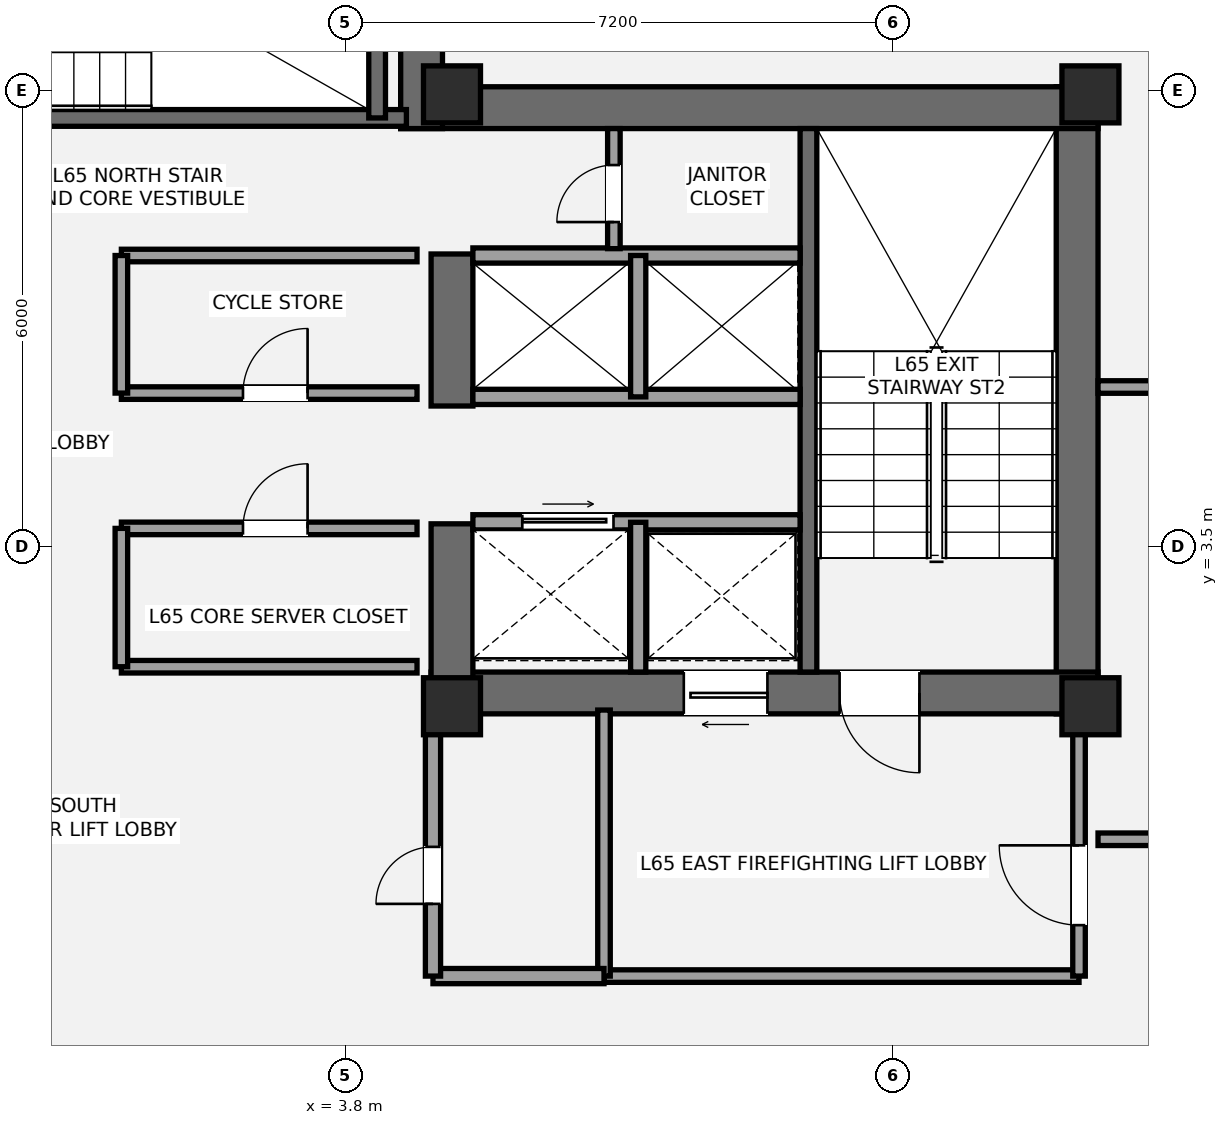
"""IFC4 building model, lengths in metres.
Left out: names, types, materials, properties, quantities, classifications, styles, units other than length and angle.
Written with IfcOpenShell. Run it as: python <this file> out.ifc"""

import sys

from ifc_helpers import new_model, si_unit, direction, frame, frame_2d, origin, origin_2d, place, context, subcontext, project, spatial, rectangle, extrude, element, fill, save


model = new_model("IFC4")
c1 = context("Model", 3, precision=1e-05, world=origin(), true_north=direction((0.0, 1.0)))
c2 = subcontext(c1, "Body", "Model", "MODEL_VIEW")
j1 = project(units=[si_unit("LENGTHUNIT", "METRE"), si_unit("PLANEANGLEUNIT", "RADIAN")], contexts=[c1])
p1 = place(None, origin())
s1 = spatial("IfcSite", under=j1, at=p1, CompositionType="ELEMENT")
p2 = place(p1, origin())
s2 = spatial("IfcBuilding", under=s1, at=p2, CompositionType="ELEMENT")
p3 = place(p2, frame((0.0, 0.0, 232.05)))
s3 = spatial("IfcBuildingStorey", under=s2, at=p3, CompositionType="ELEMENT", Elevation=232.05)
p4 = place(p3, frame((13.425, 1.3, 0.0), z_axis=(0.0, 0.0, 1.0), x_axis=(0.0, 1.0, 0.0)))
e1 = element("IfcWall", 1, at=p4, inside=s3, PredefinedType="SHEAR", context=c2, shape_type="SweptSolid", body=[
    extrude(rectangle(XDim=8.25, YDim=0.55, at=frame_2d((4.125, 0.0))), origin(), (0.0, 0.0, 1.0), 3.15),
])
p5 = place(p3, frame((4.525, 9.275, 0.0), z_axis=(0.0, 0.0, 1.0), x_axis=(1.0, 0.0, 0.0)))
e2 = element("IfcWall", 2, at=p5, inside=s3, PredefinedType="SHEAR", context=c2, shape_type="SweptSolid", body=[
    extrude(rectangle(XDim=9.175, YDim=0.55, at=frame_2d((4.587, 0.0))), origin(), (0.0, 0.0, 1.0), 3.15),
])
p6 = place(p3, frame((13.7, 1.575, 0.0), z_axis=(0.0, 0.0, 1.0), x_axis=(-1.0, 0.0, 0.0)))
e3 = element("IfcWall", 3, at=p6, inside=s3, PredefinedType="SHEAR", context=c2, shape_type="SweptSolid", body=[
    extrude(rectangle(XDim=8.775, YDim=0.55, at=frame_2d((4.387, 0.0))), origin(), (0.0, 0.0, 1.0), 3.15),
])
p7 = place(p6, frame((2.35, 0.0, 0.0)))
e4 = element("IfcOpeningElement", 4, at=p7, cuts=e3, PredefinedType="OPENING", context=c2, shape_type="SweptSolid", body=[
    extrude(rectangle(XDim=1.05, YDim=2.15, at=frame_2d((0.525, 1.075))), frame((0.0, 0.285, 0.0), z_axis=(0.0, -1.0, 0.0), x_axis=(1.0, 0.0, 0.0)), (0.0, 0.0, 1.0), 0.57),
])
p8 = place(p6, frame((4.35, 0.0, 0.0)))
e5 = element("IfcOpeningElement", 5, at=p8, cuts=e3, PredefinedType="OPENING", context=c2, shape_type="SweptSolid", body=[
    extrude(rectangle(XDim=1.1, YDim=2.2, at=frame_2d((0.55, 1.1))), frame((0.0, 0.285, 0.0), z_axis=(0.0, -1.0, 0.0), x_axis=(1.0, 0.0, 0.0)), (0.0, 0.0, 1.0), 0.57),
])
p9 = place(p3, frame((5.2, 1.3, 0.0), z_axis=(0.0, 0.0, 1.0), x_axis=(0.0, 1.0, 0.0)))
e6 = element("IfcWall", 6, at=p9, inside=s3, PredefinedType="SHEAR", context=c2, shape_type="SweptSolid", body=[
    extrude(rectangle(XDim=2.5, YDim=0.55, at=frame_2d((1.25, 0.0))), origin(), (0.0, 0.0, 1.0), 3.15),
])
p10 = place(p3, frame((5.2, 5.35, 0.0), z_axis=(0.0, 0.0, 1.0), x_axis=(0.0, 1.0, 0.0)))
e7 = element("IfcWall", 7, at=p10, inside=s3, PredefinedType="SHEAR", context=c2, shape_type="SweptSolid", body=[
    extrude(rectangle(XDim=2.0, YDim=0.55, at=frame_2d((1.0, 0.0))), origin(), (0.0, 0.0, 1.0), 3.15),
])
p11 = place(p3, frame((9.89, 1.85, 0.0), z_axis=(0.0, 0.0, 1.0), x_axis=(0.0, 1.0, 0.0)))
e8 = element("IfcWall", 8, at=p11, inside=s3, PredefinedType="SHEAR", context=c2, shape_type="SweptSolid", body=[
    extrude(rectangle(XDim=7.15, YDim=0.22, at=frame_2d((3.575, 0.0))), origin(), (0.0, 0.0, 1.0), 3.15),
])
p12 = place(p3, frame((4.8, 9.0, 0.0), z_axis=(0.0, 0.0, 1.0), x_axis=(0.0, 1.0, 0.0)))
e9 = element("IfcWall", 9, at=p12, inside=s3, PredefinedType="SHEAR", context=c2, shape_type="SweptSolid", body=[
    extrude(rectangle(XDim=3.95, YDim=0.55, at=frame_2d((1.975, 0.0))), origin(), (0.0, 0.0, 1.0), 3.15),
])
p13 = place(p3, frame((-4.7, 9.14, 0.0), z_axis=(0.0, 0.0, 1.0), x_axis=(1.0, 0.0, 0.0)))
e10 = element("IfcWall", 10, at=p13, inside=s3, PredefinedType="SHEAR", context=c2, shape_type="SweptSolid", body=[
    extrude(rectangle(XDim=9.3, YDim=0.22, at=frame_2d((4.65, 0.0))), origin(), (0.0, 0.0, 1.0), 3.15),
])
p14 = place(p13, frame((1.15, 0.0, 0.0)))
e11 = element("IfcOpeningElement", 11, at=p14, cuts=e10, PredefinedType="OPENING", context=c2, shape_type="SweptSolid", body=[
    extrude(rectangle(XDim=1.05, YDim=2.15, at=frame_2d((0.525, 1.075))), frame((0.0, 0.12, 0.0), z_axis=(0.0, -1.0, 0.0), x_axis=(1.0, 0.0, 0.0)), (0.0, 0.0, 1.0), 0.24),
])
p15 = place(p3, frame((4.215, 9.14, 0.0), z_axis=(0.0, 0.0, 1.0), x_axis=(0.0, 1.0, 0.0)))
e12 = element("IfcWall", 12, at=p15, inside=s3, PredefinedType="SHEAR", context=c2, shape_type="SweptSolid", body=[
    extrude(rectangle(XDim=3.26, YDim=0.22, at=frame_2d((1.63, 0.0))), origin(), (0.0, 0.0, 1.0), 3.15),
])
for number, where, z_axis, x_axis in (
    (13, (5.2, 1.4, 0.0), (0.0, 0.0, 1.0), (1.0, 0.0, 0.0)),
    (14, (5.2, 9.45, 0.0), (0.0, 0.0, 1.0), (1.0, 0.0, 0.0)),
    (15, (13.6, 1.4, 0.0), (0.0, 0.0, 1.0), (1.0, 0.0, 0.0)),
    (16, (13.6, 9.45, 0.0), (0.0, 0.0, 1.0), (1.0, 0.0, 0.0)),
):
    element("IfcColumn", number, at=place(p3, frame(where, z_axis=z_axis, x_axis=x_axis)), inside=s3, PredefinedType="PILASTER", context=c2, shape_type="SweptSolid", body=[
        extrude(rectangle(XDim=0.75, YDim=0.75, at=origin_2d()), origin(), (0.0, 0.0, 1.0), 3.15),
    ])
p16 = place(p3, frame((14.159, 11.619, 0.0), z_axis=(0.0, 0.0, 1.0), x_axis=(0.827641205742, -0.56125754744, 0.0)))
e17 = element("IfcWall", 17, at=p16, inside=s3, PredefinedType="STANDARD", context=c2, shape_type="SweptSolid", body=[
    extrude(rectangle(XDim=3.771, YDim=0.44, at=frame_2d((1.885, 0.0))), origin(), (0.0, 0.0, 1.0), 2.336),
])
p17 = place(p16, frame((1.477, 0.0, 0.55)))
e18 = element("IfcOpeningElement", 18, at=p17, cuts=e17, PredefinedType="OPENING", context=c2, shape_type="SweptSolid", body=[
    extrude(rectangle(XDim=1.75, YDim=1.55, at=frame_2d((0.875, 0.775))), frame((0.0, 0.23, 0.0), z_axis=(0.0, -1.0, 0.0), x_axis=(1.0, 0.0, 0.0)), (0.0, 0.0, 1.0), 0.46),
])
p18 = place(p3, frame((7.2, -2.15, 0.0), z_axis=(0.0, 0.0, 1.0), x_axis=(1.0, 0.0, 0.0)))
e19 = element("IfcWall", 19, at=p18, inside=s3, PredefinedType="PARTITIONING", context=c2, shape_type="SweptSolid", body=[
    extrude(rectangle(XDim=6.25, YDim=0.165, at=frame_2d((3.125, 0.0))), origin(), (0.0, 0.0, 1.0), 2.97),
])
p19 = place(p3, frame((7.2, -2.15, 0.0), z_axis=(0.0, 0.0, 1.0), x_axis=(0.0, 1.0, 0.0)))
e20 = element("IfcWall", 20, at=p19, inside=s3, PredefinedType="PARTITIONING", context=c2, shape_type="SweptSolid", body=[
    extrude(rectangle(XDim=3.5, YDim=0.165, at=frame_2d((1.75, 0.0))), origin(), (0.0, 0.0, 1.0), 2.423),
])
p20 = place(p3, frame((13.45, -2.15, 0.0), z_axis=(0.0, 0.0, 1.0), x_axis=(0.0, 1.0, 0.0)))
e21 = element("IfcWall", 21, at=p20, inside=s3, PredefinedType="PARTITIONING", context=c2, shape_type="SweptSolid", body=[
    extrude(rectangle(XDim=3.5, YDim=0.165, at=frame_2d((1.75, 0.0))), origin(), (0.0, 0.0, 1.0), 2.423),
])
p21 = place(p20, frame((0.67, 0.0, 0.0)))
e22 = element("IfcOpeningElement", 22, at=p21, cuts=e21, PredefinedType="OPENING", context=c2, shape_type="SweptSolid", body=[
    extrude(rectangle(XDim=1.05, YDim=2.15, at=frame_2d((0.525, 1.075))), frame((0.0, 0.093, 0.0), z_axis=(0.0, -1.0, 0.0), x_axis=(1.0, 0.0, 0.0)), (0.0, 0.0, 1.0), 0.185),
])
p22 = place(p3, frame((4.95, -2.15, 0.0), z_axis=(0.0, 0.0, 1.0), x_axis=(1.0, 0.0, 0.0)))
e23 = element("IfcWall", 23, at=p22, inside=s3, PredefinedType="SOLIDWALL", context=c2, shape_type="SweptSolid", body=[
    extrude(rectangle(XDim=2.25, YDim=0.2, at=frame_2d((1.125, 0.0))), origin(), (0.0, 0.0, 1.0), 2.97),
])
p23 = place(p3, frame((4.95, -2.15, 0.0), z_axis=(0.0, 0.0, 1.0), x_axis=(0.0, 1.0, 0.0)))
e24 = element("IfcWall", 24, at=p23, inside=s3, PredefinedType="SOLIDWALL", context=c2, shape_type="SweptSolid", body=[
    extrude(rectangle(XDim=3.5, YDim=0.2, at=frame_2d((1.75, 0.0))), origin(), (0.0, 0.0, 1.0), 2.423),
])
p24 = place(p23, frame((0.95, 0.0, 0.0)))
e25 = element("IfcOpeningElement", 25, at=p24, cuts=e24, PredefinedType="OPENING", context=c2, shape_type="SweptSolid", body=[
    extrude(rectangle(XDim=0.75, YDim=2.1, at=frame_2d((0.375, 1.05))), frame((0.0, 0.11, 0.0), z_axis=(0.0, -1.0, 0.0), x_axis=(1.0, 0.0, 0.0)), (0.0, 0.0, 1.0), 0.22),
])
p25 = place(p3, frame((5.475, 3.82, 0.0), z_axis=(0.0, 0.0, 1.0), x_axis=(1.0, 0.0, 0.0)))
e26 = element("IfcWall", 26, at=p25, inside=s3, PredefinedType="SOLIDWALL", context=c2, shape_type="SweptSolid", body=[
    extrude(rectangle(XDim=4.305, YDim=0.2, at=frame_2d((2.152, 0.0))), origin(), (0.0, 0.0, 1.0), 2.97),
])
p26 = place(p25, frame((0.65, 0.0, 0.0)))
e27 = element("IfcOpeningElement", 27, at=p26, cuts=e26, PredefinedType="OPENING", context=c2, shape_type="SweptSolid", body=[
    extrude(rectangle(XDim=1.2, YDim=2.2, at=frame_2d((0.6, 1.1))), frame((0.0, 0.11, 0.0), z_axis=(0.0, -1.0, 0.0), x_axis=(1.0, 0.0, 0.0)), (0.0, 0.0, 1.0), 0.22),
])
p27 = place(p3, frame((7.65, 1.85, 0.0), z_axis=(0.0, 0.0, 1.0), x_axis=(0.0, 1.0, 0.0)))
e28 = element("IfcWall", 28, at=p27, inside=s3, PredefinedType="SOLIDWALL", context=c2, shape_type="SweptSolid", body=[
    extrude(rectangle(XDim=1.97, YDim=0.2, at=frame_2d((0.985, 0.0))), origin(), (0.0, 0.0, 1.0), 2.97),
])
for number, where, z_axis, x_axis in (
    (29, (5.475, 5.47, 0.0), (0.0, 0.0, 1.0), (1.0, 0.0, 0.0)),
    (30, (5.475, 7.33, 0.0), (0.0, 0.0, 1.0), (1.0, 0.0, 0.0)),
):
    element("IfcWall", number, at=place(p3, frame(where, z_axis=z_axis, x_axis=x_axis)), inside=s3, PredefinedType="SOLIDWALL", context=c2, shape_type="SweptSolid", body=[
        extrude(rectangle(XDim=4.305, YDim=0.2, at=frame_2d((2.152, 0.0))), origin(), (0.0, 0.0, 1.0), 2.97),
    ])
p28 = place(p3, frame((7.65, 5.47, 0.0), z_axis=(0.0, 0.0, 1.0), x_axis=(0.0, 1.0, 0.0)))
e31 = element("IfcWall", 31, at=p28, inside=s3, PredefinedType="SOLIDWALL", context=c2, shape_type="SweptSolid", body=[
    extrude(rectangle(XDim=1.86, YDim=0.2, at=frame_2d((0.93, 0.0))), origin(), (0.0, 0.0, 1.0), 2.97),
])
p29 = place(p3, frame((0.85, 1.92, 0.0), z_axis=(0.0, 0.0, 1.0), x_axis=(1.0, 0.0, 0.0)))
e32 = element("IfcWall", 32, at=p29, inside=s3, PredefinedType="PARTITIONING", context=c2, shape_type="SweptSolid", body=[
    extrude(rectangle(XDim=3.89, YDim=0.165, at=frame_2d((1.945, 0.0))), origin(), (0.0, 0.0, 1.0), 2.11),
])
p30 = place(p3, frame((0.85, 3.74, 0.0), z_axis=(0.0, 0.0, 1.0), x_axis=(1.0, 0.0, 0.0)))
e33 = element("IfcWall", 33, at=p30, inside=s3, PredefinedType="PARTITIONING", context=c2, shape_type="SweptSolid", body=[
    extrude(rectangle(XDim=3.89, YDim=0.165, at=frame_2d((1.945, 0.0))), origin(), (0.0, 0.0, 1.0), 2.97),
])
p31 = place(p30, frame((1.6, 0.0, 0.0)))
e34 = element("IfcOpeningElement", 34, at=p31, cuts=e33, PredefinedType="OPENING", context=c2, shape_type="SweptSolid", body=[
    extrude(rectangle(XDim=0.85, YDim=2.1, at=frame_2d((0.425, 1.05))), frame((0.0, 0.093, 0.0), z_axis=(0.0, -1.0, 0.0), x_axis=(1.0, 0.0, 0.0)), (0.0, 0.0, 1.0), 0.185),
])
p32 = place(p3, frame((0.85, 1.92, 0.0), z_axis=(0.0, 0.0, 1.0), x_axis=(0.0, 1.0, 0.0)))
e35 = element("IfcWall", 35, at=p32, inside=s3, PredefinedType="PARTITIONING", context=c2, shape_type="SweptSolid", body=[
    extrude(rectangle(XDim=1.82, YDim=0.165, at=frame_2d((0.91, 0.0))), origin(), (0.0, 0.0, 1.0), 2.97),
])
p33 = place(p3, frame((0.85, 5.52, 0.0), z_axis=(0.0, 0.0, 1.0), x_axis=(1.0, 0.0, 0.0)))
e36 = element("IfcWall", 36, at=p33, inside=s3, PredefinedType="PARTITIONING", context=c2, shape_type="SweptSolid", body=[
    extrude(rectangle(XDim=3.89, YDim=0.165, at=frame_2d((1.945, 0.0))), origin(), (0.0, 0.0, 1.0), 2.97),
])
p34 = place(p33, frame((1.6, 0.0, 0.0)))
e37 = element("IfcOpeningElement", 37, at=p34, cuts=e36, PredefinedType="OPENING", context=c2, shape_type="SweptSolid", body=[
    extrude(rectangle(XDim=0.85, YDim=2.1, at=frame_2d((0.425, 1.05))), frame((0.0, 0.093, 0.0), z_axis=(0.0, -1.0, 0.0), x_axis=(1.0, 0.0, 0.0)), (0.0, 0.0, 1.0), 0.185),
])
p35 = place(p3, frame((0.85, 7.33, 0.0), z_axis=(0.0, 0.0, 1.0), x_axis=(1.0, 0.0, 0.0)))
e38 = element("IfcWall", 38, at=p35, inside=s3, PredefinedType="PARTITIONING", context=c2, shape_type="SweptSolid", body=[
    extrude(rectangle(XDim=3.89, YDim=0.165, at=frame_2d((1.945, 0.0))), origin(), (0.0, 0.0, 1.0), 2.97),
])
p36 = place(p3, frame((0.85, 5.52, 0.0), z_axis=(0.0, 0.0, 1.0), x_axis=(0.0, 1.0, 0.0)))
e39 = element("IfcWall", 39, at=p36, inside=s3, PredefinedType="PARTITIONING", context=c2, shape_type="SweptSolid", body=[
    extrude(rectangle(XDim=1.81, YDim=0.165, at=frame_2d((0.905, 0.0))), origin(), (0.0, 0.0, 1.0), 2.97),
])
p37 = place(p3, frame((7.33, 7.42, 0.0), z_axis=(0.0, 0.0, 1.0), x_axis=(0.0, 1.0, 0.0)))
e40 = element("IfcWall", 40, at=p37, inside=s3, PredefinedType="PARTITIONING", context=c2, shape_type="SweptSolid", body=[
    extrude(rectangle(XDim=1.58, YDim=0.165, at=frame_2d((0.79, 0.0))), origin(), (0.0, 0.0, 1.0), 2.97),
])
p38 = place(p37, frame((0.35, 0.0, 0.0)))
e41 = element("IfcOpeningElement", 41, at=p38, cuts=e40, PredefinedType="OPENING", context=c2, shape_type="SweptSolid", body=[
    extrude(rectangle(XDim=0.75, YDim=2.1, at=frame_2d((0.375, 1.05))), frame((0.0, 0.093, 0.0), z_axis=(0.0, -1.0, 0.0), x_axis=(1.0, 0.0, 0.0)), (0.0, 0.0, 1.0), 0.185),
])
p39 = place(p3, frame((13.7, -0.35, 0.0), z_axis=(0.0, 0.0, 1.0), x_axis=(1.0, 0.0, 0.0)))
e42 = element("IfcWall", 42, at=p39, inside=s3, PredefinedType="PARTITIONING", context=c2, shape_type="SweptSolid", body=[
    extrude(rectangle(XDim=2.3, YDim=0.165, at=frame_2d((1.15, 0.0))), origin(), (0.0, 0.0, 1.0), 2.423),
])
p40 = place(p3, frame((13.7, 5.6, 0.0), z_axis=(0.0, 0.0, 1.0), x_axis=(1.0, 0.0, 0.0)))
e43 = element("IfcWall", 43, at=p40, inside=s3, PredefinedType="PARTITIONING", context=c2, shape_type="SweptSolid", body=[
    extrude(rectangle(XDim=6.527, YDim=0.165, at=frame_2d((3.264, 0.0))), origin(), (0.0, 0.0, 1.0), 2.423),
])
p41 = place(p40, frame((3.199, 0.0, 0.0)))
e44 = element("IfcOpeningElement", 44, at=p41, cuts=e43, PredefinedType="OPENING", context=c2, shape_type="SweptSolid", body=[
    extrude(rectangle(XDim=0.9, YDim=2.1, at=frame_2d((0.45, 1.05))), frame((0.0, 0.093, 0.0), z_axis=(0.0, -1.0, 0.0), x_axis=(1.0, 0.0, 0.0)), (0.0, 0.0, 1.0), 0.185),
])
p42 = place(p7, origin())
e45 = element("IfcDoor", 45, at=p42, inside=s3, OperationType="SINGLE_SWING_LEFT", PredefinedType="DOOR", context=c2, shape_type="SweptSolid", body=[
    extrude(rectangle(XDim=1.05, YDim=2.15, at=frame_2d((0.525, 1.075))), frame((0.0, 0.025, 0.0), z_axis=(0.0, -1.0, 0.0), x_axis=(1.0, 0.0, 0.0)), (0.0, 0.0, 1.0), 0.05),
])
fill(e4, e45)
p43 = place(p21, origin())
e46 = element("IfcDoor", 46, at=p43, inside=s3, OperationType="SINGLE_SWING_RIGHT", PredefinedType="DOOR", context=c2, shape_type="SweptSolid", body=[
    extrude(rectangle(XDim=1.05, YDim=2.15, at=frame_2d((0.525, 1.075))), frame((0.0, 0.025, 0.0), z_axis=(0.0, -1.0, 0.0), x_axis=(1.0, 0.0, 0.0)), (0.0, 0.0, 1.0), 0.05),
])
fill(e22, e46)
p44 = place(p24, origin())
e47 = element("IfcDoor", 47, at=p44, inside=s3, OperationType="SINGLE_SWING_LEFT", PredefinedType="DOOR", context=c2, shape_type="SweptSolid", body=[
    extrude(rectangle(XDim=0.75, YDim=2.1, at=frame_2d((0.375, 1.05))), frame((0.0, 0.025, 0.0), z_axis=(0.0, -1.0, 0.0), x_axis=(1.0, 0.0, 0.0)), (0.0, 0.0, 1.0), 0.05),
])
fill(e25, e47)
p45 = place(p8, origin())
e48 = element("IfcDoor", 48, at=p45, inside=s3, OperationType="SLIDING_TO_LEFT", PredefinedType="DOOR", context=c2, shape_type="SweptSolid", body=[
    extrude(rectangle(XDim=1.1, YDim=2.2, at=frame_2d((0.55, 1.1))), frame((0.0, 0.025, 0.0), z_axis=(0.0, -1.0, 0.0), x_axis=(1.0, 0.0, 0.0)), (0.0, 0.0, 1.0), 0.05),
])
fill(e5, e48)
p46 = place(p26, origin())
e49 = element("IfcDoor", 49, at=p46, inside=s3, OperationType="SLIDING_TO_RIGHT", PredefinedType="DOOR", context=c2, shape_type="SweptSolid", body=[
    extrude(rectangle(XDim=1.2, YDim=2.2, at=frame_2d((0.6, 1.1))), frame((0.0, 0.025, 0.0), z_axis=(0.0, -1.0, 0.0), x_axis=(1.0, 0.0, 0.0)), (0.0, 0.0, 1.0), 0.05),
])
fill(e27, e49)
p47 = place(p31, origin())
e50 = element("IfcDoor", 50, at=p47, inside=s3, OperationType="SINGLE_SWING_RIGHT", PredefinedType="DOOR", context=c2, shape_type="SweptSolid", body=[
    extrude(rectangle(XDim=0.85, YDim=2.1, at=frame_2d((0.425, 1.05))), frame((0.0, 0.025, 0.0), z_axis=(0.0, -1.0, 0.0), x_axis=(1.0, 0.0, 0.0)), (0.0, 0.0, 1.0), 0.05),
])
fill(e34, e50)
p48 = place(p34, origin())
e51 = element("IfcDoor", 51, at=p48, inside=s3, OperationType="SINGLE_SWING_RIGHT", PredefinedType="DOOR", context=c2, shape_type="SweptSolid", body=[
    extrude(rectangle(XDim=0.85, YDim=2.1, at=frame_2d((0.425, 1.05))), frame((0.0, 0.025, 0.0), z_axis=(0.0, -1.0, 0.0), x_axis=(1.0, 0.0, 0.0)), (0.0, 0.0, 1.0), 0.05),
])
fill(e37, e51)
p49 = place(p38, origin())
e52 = element("IfcDoor", 52, at=p49, inside=s3, OperationType="SINGLE_SWING_LEFT", PredefinedType="DOOR", context=c2, shape_type="SweptSolid", body=[
    extrude(rectangle(XDim=0.75, YDim=2.1, at=frame_2d((0.375, 1.05))), frame((0.0, 0.025, 0.0), z_axis=(0.0, -1.0, 0.0), x_axis=(1.0, 0.0, 0.0)), (0.0, 0.0, 1.0), 0.05),
])
fill(e41, e52)
save(model, sys.argv[1])
